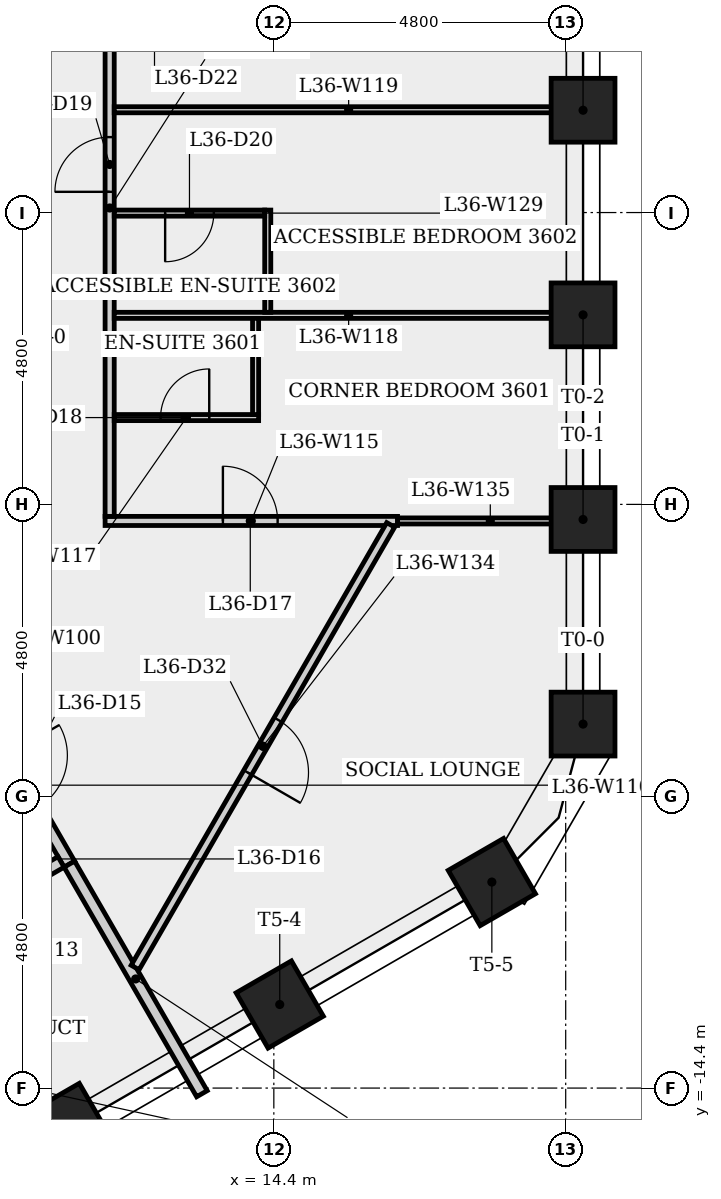
"""IFC4 building model, lengths in metres.
Left out: names, types, materials, properties, quantities, classifications, styles, units other than length and angle.
Written with IfcOpenShell. Run it as: python <this file> out.ifc"""

import sys

from ifc_helpers import new_model, si_unit, direction, frame, frame_2d, origin, origin_2d, place, context, subcontext, project, spatial, rectangle, extrude, element, fill, save


model = new_model("IFC4")
c1 = context("Model", 3, precision=1e-05, world=origin(), true_north=direction((0.0, 1.0)))
c2 = subcontext(c1, "Body", "Model", "MODEL_VIEW")
j1 = project(units=[si_unit("LENGTHUNIT", "METRE"), si_unit("PLANEANGLEUNIT", "RADIAN")], contexts=[c1])
p1 = place(None, origin())
s1 = spatial("IfcSite", under=j1, at=p1, CompositionType="ELEMENT")
p2 = place(p1, origin())
s2 = spatial("IfcBuilding", under=s1, at=p2, CompositionType="ELEMENT")
p3 = place(p2, frame((0.0, 0.0, 135.9)))
s3 = spatial("IfcBuildingStorey", under=s2, at=p3, CompositionType="ELEMENT", Elevation=135.9)
for number, where, z_axis, x_axis in (
    (1, (19.486, -8.413, 0.0), (0.0, 0.0, 1.0), (1.0, 0.0, 0.0)),
    (2, (19.486, -5.048, 0.0), (0.0, 0.0, 1.0), (1.0, 0.0, 0.0)),
    (3, (19.486, -1.683, 0.0), (0.0, 0.0, 1.0), (1.0, 0.0, 0.0)),
    (4, (19.486, 1.683, 0.0), (0.0, 0.0, 1.0), (1.0, 0.0, 0.0)),
    (5, (11.009, -15.04, 0.0), (0.0, 0.0, 1.0), (0.5, -0.866, 0.0)),
    (6, (14.497, -13.026, 0.0), (0.0, 0.0, 1.0), (0.5, -0.866, 0.0)),
    (7, (17.986, -11.011, 0.0), (0.0, 0.0, 1.0), (0.5, -0.866, 0.0)),
):
    element("IfcColumn", number, at=place(p3, frame(where, z_axis=z_axis, x_axis=x_axis)), inside=s3, PredefinedType="COLUMN", context=c2, shape_type="SweptSolid", body=[
        extrude(rectangle(XDim=1.05, YDim=1.05, at=origin_2d()), origin(), (0.0, 0.0, 1.0), 4.0),
    ])
p4 = place(p3, frame((9.537, -8.119, 0.0), z_axis=(0.0, 0.0, 1.0), x_axis=(0.499990139034, -0.866031096941, 0.0)))
e8 = element("IfcWall", 8, at=p4, inside=s3, PredefinedType="PARTITIONING", context=c2, shape_type="SweptSolid", body=[
    extrude(rectangle(XDim=3.0, YDim=0.2, at=frame_2d((1.5, 0.0))), origin(), (0.0, 0.0, 1.0), 3.6),
])
p5 = place(p4, frame((0.935, 0.0, 0.0)))
e9 = element("IfcOpeningElement", 9, at=p5, cuts=e8, PredefinedType="OPENING", context=c2, shape_type="SweptSolid", body=[
    extrude(rectangle(XDim=1.0, YDim=2.1, at=frame_2d((0.5, 1.05))), frame((0.0, 0.11, 0.0), z_axis=(0.0, -1.0, 0.0), x_axis=(1.0, 0.0, 0.0)), (0.0, 0.0, 1.0), 0.22),
])
p6 = place(p3, frame((11.037, -10.717, 0.0), z_axis=(0.0, 0.0, 1.0), x_axis=(0.50001167932, -0.866018660621, 0.0)))
e10 = element("IfcWall", 10, at=p6, inside=s3, PredefinedType="PLUMBINGWALL", context=c2, shape_type="SweptSolid", body=[
    extrude(rectangle(XDim=4.36, YDim=0.2, at=frame_2d((2.18, 0.0))), origin(), (0.0, 0.0, 1.0), 3.6),
])
p7 = place(p3, frame((10.901, -10.681, 0.0), z_axis=(0.0, 0.0, 1.0), x_axis=(-0.866007538022, -0.500030943131, 0.0)))
e11 = element("IfcWall", 11, at=p7, inside=s3, PredefinedType="PLUMBINGWALL", context=c2, shape_type="SweptSolid", body=[
    extrude(rectangle(XDim=2.375, YDim=0.2, at=frame_2d((1.188, 0.0))), origin(), (0.0, 0.0, 1.0), 3.6),
])
p8 = place(p3, frame((11.625, -5.072, 0.0), z_axis=(0.0, 0.0, 1.0), x_axis=(1.0, 0.0, 0.0)))
e12 = element("IfcWall", 12, at=p8, inside=s3, PredefinedType="PARTITIONING", context=c2, shape_type="SweptSolid", body=[
    extrude(rectangle(XDim=4.809, YDim=0.15, at=frame_2d((2.405, 0.0))), origin(), (0.0, 0.0, 1.0), 3.6),
])
p9 = place(p8, frame((1.938, 0.0, 0.0)))
e13 = element("IfcOpeningElement", 13, at=p9, cuts=e12, PredefinedType="OPENING", context=c2, shape_type="SweptSolid", body=[
    extrude(rectangle(XDim=0.9, YDim=2.1, at=frame_2d((0.45, 1.05))), frame((0.0, 0.085, 0.0), z_axis=(0.0, -1.0, 0.0), x_axis=(1.0, 0.0, 0.0)), (0.0, 0.0, 1.0), 0.17),
])
p10 = place(p3, frame((11.7, -4.997, 0.0), z_axis=(0.0, 0.0, 1.0), x_axis=(0.0, 1.0, 0.0)))
e14 = element("IfcWall", 14, at=p10, inside=s3, PredefinedType="PARTITIONING", context=c2, shape_type="SweptSolid", body=[
    extrude(rectangle(XDim=10.145, YDim=0.15, at=frame_2d((5.072, 0.0))), origin(), (0.0, 0.0, 1.0), 3.6),
])
p11 = place(p10, frame((5.338, 0.0, 0.0)))
e15 = element("IfcOpeningElement", 15, at=p11, cuts=e14, PredefinedType="OPENING", context=c2, shape_type="SweptSolid", body=[
    extrude(rectangle(XDim=0.9, YDim=2.1, at=frame_2d((0.45, 1.05))), frame((0.0, 0.085, 0.0), z_axis=(0.0, -1.0, 0.0), x_axis=(1.0, 0.0, 0.0)), (0.0, 0.0, 1.0), 0.17),
])
p12 = place(p3, frame((11.775, -3.372, 0.0), z_axis=(0.0, 0.0, 1.0), x_axis=(1.0, 0.0, 0.0)))
e16 = element("IfcWall", 16, at=p12, inside=s3, PredefinedType="PARTITIONING", context=c2, shape_type="SweptSolid", body=[
    extrude(rectangle(XDim=2.375, YDim=0.1, at=frame_2d((1.188, 0.0))), origin(), (0.0, 0.0, 1.0), 3.6),
])
p13 = place(p12, frame((0.762, 0.0, 0.0)))
e17 = element("IfcOpeningElement", 17, at=p13, cuts=e16, PredefinedType="OPENING", context=c2, shape_type="SweptSolid", body=[
    extrude(rectangle(XDim=0.8, YDim=2.1, at=frame_2d((0.4, 1.05))), frame((0.0, 0.06, 0.0), z_axis=(0.0, -1.0, 0.0), x_axis=(1.0, 0.0, 0.0)), (0.0, 0.0, 1.0), 0.12),
])
for number, where, z_axis, x_axis in (
    (18, (11.775, -1.691, 0.0), (0.0, 0.0, 1.0), (1.0, 0.0, 0.0)),
    (19, (11.775, 1.691, 0.0), (0.0, 0.0, 1.0), (1.0, 0.0, 0.0)),
):
    element("IfcWall", number, at=place(p3, frame(where, z_axis=z_axis, x_axis=x_axis)), inside=s3, PredefinedType="PARTITIONING", context=c2, shape_type="SweptSolid", body=[
        extrude(rectangle(XDim=7.711, YDim=0.1, at=frame_2d((3.855, 0.0))), origin(), (0.0, 0.0, 1.0), 3.6),
    ])
p14 = place(p3, frame((14.1, -3.322, 0.0), z_axis=(0.0, 0.0, 1.0), x_axis=(0.0, 1.0, 0.0)))
e20 = element("IfcWall", 20, at=p14, inside=s3, PredefinedType="PARTITIONING", context=c2, shape_type="SweptSolid", body=[
    extrude(rectangle(XDim=1.582, YDim=0.1, at=frame_2d((0.791, 0.0))), origin(), (0.0, 0.0, 1.0), 3.6),
])
p15 = place(p3, frame((14.3, -1.641, 0.0), z_axis=(0.0, 0.0, 1.0), x_axis=(0.0, 1.0, 0.0)))
e21 = element("IfcWall", 21, at=p15, inside=s3, PredefinedType="PARTITIONING", context=c2, shape_type="SweptSolid", body=[
    extrude(rectangle(XDim=1.681, YDim=0.1, at=frame_2d((0.841, 0.0))), origin(), (0.0, 0.0, 1.0), 3.6),
])
p16 = place(p3, frame((14.25, -0.009, 0.0), z_axis=(0.0, 0.0, 1.0), x_axis=(-1.0, 0.0, 0.0)))
e22 = element("IfcWall", 22, at=p16, inside=s3, PredefinedType="PARTITIONING", context=c2, shape_type="SweptSolid", body=[
    extrude(rectangle(XDim=2.475, YDim=0.1, at=frame_2d((1.238, 0.0))), origin(), (0.0, 0.0, 1.0), 3.6),
])
p17 = place(p16, frame((0.837, 0.0, 0.0)))
e23 = element("IfcOpeningElement", 23, at=p17, cuts=e22, PredefinedType="OPENING", context=c2, shape_type="SweptSolid", body=[
    extrude(rectangle(XDim=0.8, YDim=2.1, at=frame_2d((0.4, 1.05))), frame((0.0, 0.06, 0.0), z_axis=(0.0, -1.0, 0.0), x_axis=(1.0, 0.0, 0.0)), (0.0, 0.0, 1.0), 0.12),
])
p18 = place(p3, frame((16.322, -5.137, 0.0), z_axis=(0.0, 0.0, 1.0), x_axis=(-0.49999983278, -0.866025500329, 0.0)))
e24 = element("IfcWall", 24, at=p18, inside=s3, PredefinedType="PARTITIONING", context=c2, shape_type="SweptSolid", body=[
    extrude(rectangle(XDim=8.406, YDim=0.15, at=frame_2d((4.203, 0.0))), origin(), (0.0, 0.0, 1.0), 3.6),
])
p19 = place(p18, frame((3.703, 0.0, 0.0)))
e25 = element("IfcOpeningElement", 25, at=p19, cuts=e24, PredefinedType="OPENING", context=c2, shape_type="SweptSolid", body=[
    extrude(rectangle(XDim=1.0, YDim=2.1, at=frame_2d((0.5, 1.05))), frame((0.0, 0.085, 0.0), z_axis=(0.0, -1.0, 0.0), x_axis=(1.0, 0.0, 0.0)), (0.0, 0.0, 1.0), 0.17),
])
p20 = place(p3, frame((19.486, -5.072, 0.0), z_axis=(0.0, 0.0, 1.0), x_axis=(-1.0, 0.0, 0.0)))
e26 = element("IfcWall", 26, at=p20, inside=s3, PredefinedType="PARTITIONING", context=c2, shape_type="SweptSolid", body=[
    extrude(rectangle(XDim=3.051, YDim=0.1, at=frame_2d((1.526, 0.0))), origin(), (0.0, 0.0, 1.0), 3.6),
])
p21 = place(p9, origin())
e27 = element("IfcDoor", 27, at=p21, inside=s3, OperationType="SINGLE_SWING_LEFT", PredefinedType="DOOR", context=c2, shape_type="SweptSolid", body=[
    extrude(rectangle(XDim=0.9, YDim=2.1, at=frame_2d((0.45, 1.05))), frame((0.0, 0.025, 0.0), z_axis=(0.0, -1.0, 0.0), x_axis=(1.0, 0.0, 0.0)), (0.0, 0.0, 1.0), 0.05),
])
fill(e13, e27)
p22 = place(p13, origin())
e28 = element("IfcDoor", 28, at=p22, inside=s3, OperationType="SINGLE_SWING_RIGHT", PredefinedType="DOOR", context=c2, shape_type="SweptSolid", body=[
    extrude(rectangle(XDim=0.8, YDim=2.1, at=frame_2d((0.4, 1.05))), frame((0.0, 0.025, 0.0), z_axis=(0.0, -1.0, 0.0), x_axis=(1.0, 0.0, 0.0)), (0.0, 0.0, 1.0), 0.05),
])
fill(e17, e28)
p23 = place(p11, origin())
e29 = element("IfcDoor", 29, at=p23, inside=s3, OperationType="SINGLE_SWING_LEFT", PredefinedType="DOOR", context=c2, shape_type="SweptSolid", body=[
    extrude(rectangle(XDim=0.9, YDim=2.1, at=frame_2d((0.45, 1.05))), frame((0.0, 0.025, 0.0), z_axis=(0.0, -1.0, 0.0), x_axis=(1.0, 0.0, 0.0)), (0.0, 0.0, 1.0), 0.05),
])
fill(e15, e29)
p24 = place(p17, origin())
e30 = element("IfcDoor", 30, at=p24, inside=s3, OperationType="SINGLE_SWING_RIGHT", PredefinedType="DOOR", context=c2, shape_type="SweptSolid", body=[
    extrude(rectangle(XDim=0.8, YDim=2.1, at=frame_2d((0.4, 1.05))), frame((0.0, 0.025, 0.0), z_axis=(0.0, -1.0, 0.0), x_axis=(1.0, 0.0, 0.0)), (0.0, 0.0, 1.0), 0.05),
])
fill(e23, e30)
p25 = place(p19, origin())
e31 = element("IfcDoor", 31, at=p25, inside=s3, OperationType="SINGLE_SWING_RIGHT", PredefinedType="DOOR", context=c2, shape_type="SweptSolid", body=[
    extrude(rectangle(XDim=1.0, YDim=2.1, at=frame_2d((0.5, 1.05))), frame((0.0, 0.025, 0.0), z_axis=(0.0, -1.0, 0.0), x_axis=(1.0, 0.0, 0.0)), (0.0, 0.0, 1.0), 0.05),
])
fill(e25, e31)
save(model, sys.argv[1])
